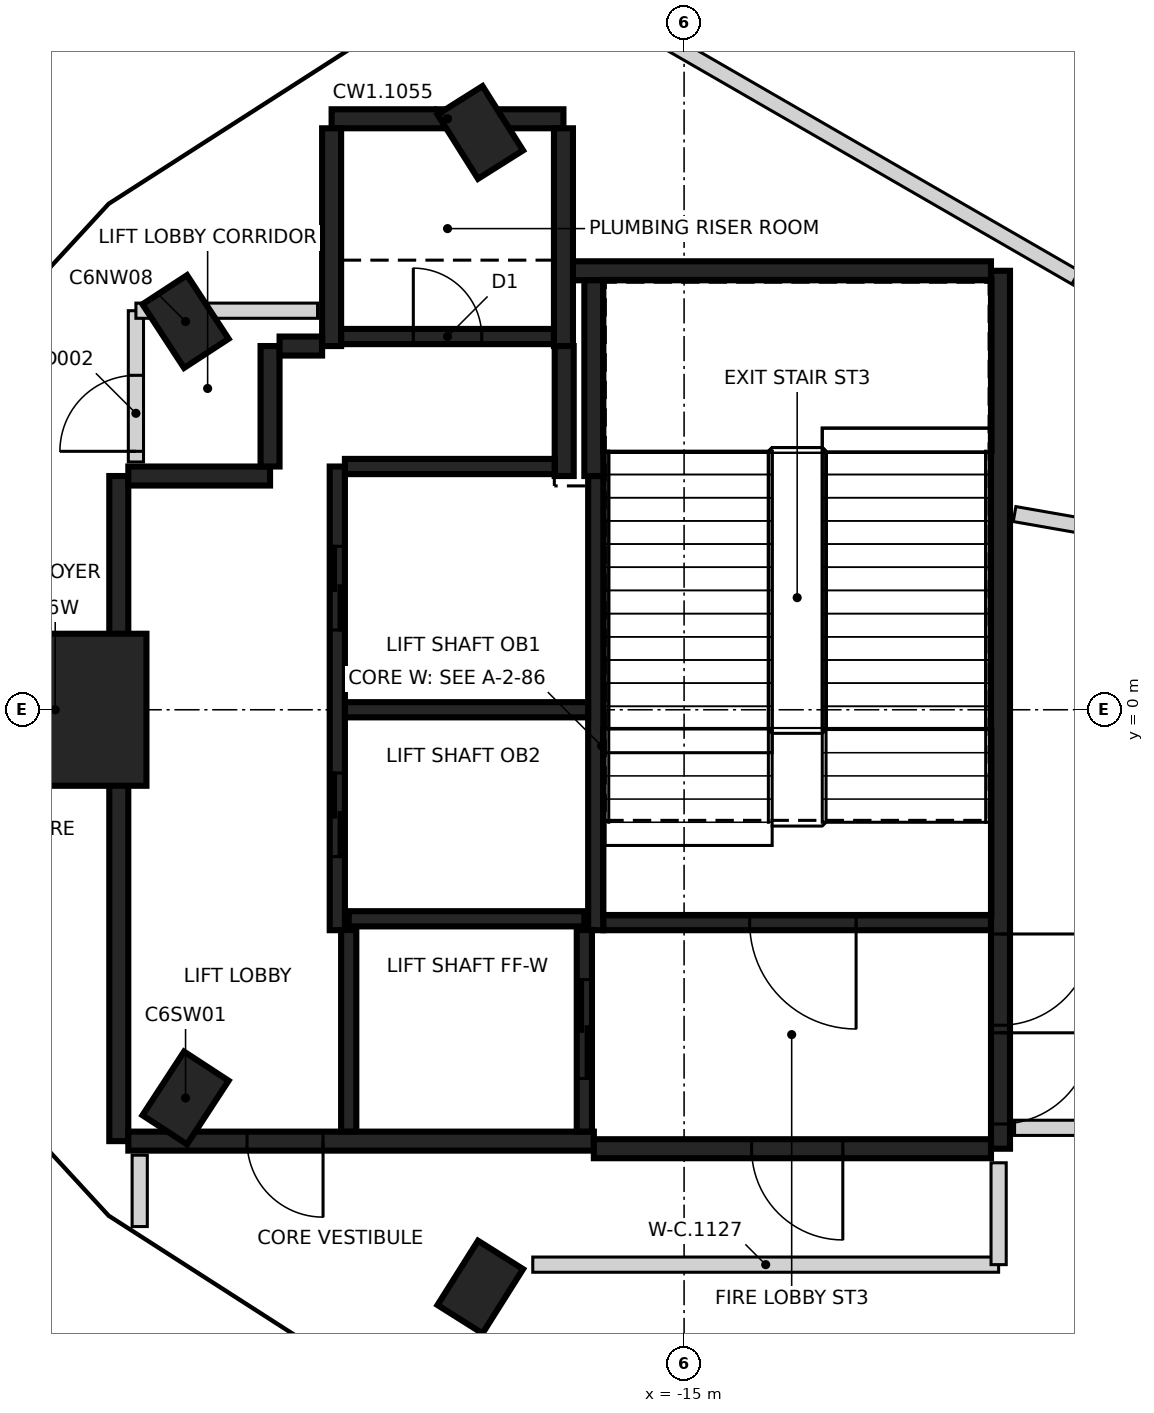
"""IFC4 building model, lengths in metres.
Left out: names, types, materials, properties, quantities, classifications, styles, units other than length and angle.
Written with IfcOpenShell. Run it as: python <this file> out.ifc"""

import sys

from ifc_helpers import new_model, si_unit, direction, frame, frame_2d, origin, origin_2d, place, context, subcontext, project, spatial, rectangle, extrude, element, fill, save


model = new_model("IFC4")
c1 = context("Model", 3, precision=1e-05, world=origin(), true_north=direction((0.0, 1.0)))
c2 = subcontext(c1, "Body", "Model", "MODEL_VIEW")
j1 = project(units=[si_unit("LENGTHUNIT", "METRE"), si_unit("PLANEANGLEUNIT", "RADIAN")], contexts=[c1])
p1 = place(None, origin())
s1 = spatial("IfcSite", under=j1, at=p1, CompositionType="ELEMENT")
p2 = place(p1, origin())
s2 = spatial("IfcBuilding", under=s1, at=p2, CompositionType="ELEMENT")
p3 = place(p2, frame((0.0, 0.0, 312.6)))
s3 = spatial("IfcBuildingStorey", under=s2, at=p3, CompositionType="ELEMENT", Elevation=312.6)
for number, where, z_axis, x_axis in (
    (1, (-17.681, 7.595, -0.35), (0.0, 0.0, 1.0), (-0.533, 0.846, 0.0)),
    (2, (-21.559, 5.107, -0.35), (0.0, 0.0, 1.0), (-0.547, 0.837, 0.0)),
    (3, (-21.559, -5.107, -0.35), (0.0, 0.0, 1.0), (0.547, 0.837, 0.0)),
    (4, (-17.681, -7.595, -0.35), (0.0, 0.0, 1.0), (0.533, 0.846, 0.0)),
):
    element("IfcColumn", number, at=place(p3, frame(where, z_axis=z_axis, x_axis=x_axis)), inside=s3, PredefinedType="COLUMN", context=c2, shape_type="SweptSolid", body=[
        extrude(rectangle(XDim=1.0, YDim=0.7, at=origin_2d()), origin(), (0.0, 0.0, 1.0), 8.1),
    ])
p4 = place(p3, frame((-23.273, 0.0, -0.35), z_axis=(0.0, 0.0, 1.0), x_axis=(1.0, 0.0, 0.0)))
e5 = element("IfcColumn", 5, at=p4, inside=s3, PredefinedType="COLUMN", context=c2, shape_type="SweptSolid", body=[
    extrude(rectangle(XDim=2.4, YDim=2.0, at=origin_2d()), origin(), (0.0, 0.0, 1.0), 8.1),
])
p5 = place(p3, frame((-10.837, 5.775, 0.0), z_axis=(0.0, 0.0, 1.0), x_axis=(0.0, -1.0, 0.0)))
e6 = element("IfcWall", 6, at=p5, inside=s3, PredefinedType="SHEAR", context=c2, shape_type="SweptSolid", body=[
    extrude(rectangle(XDim=11.55, YDim=0.25, at=frame_2d((5.775, 0.0))), origin(), (0.0, 0.0, 1.0), 7.75),
])
p6 = place(p5, frame((10.025, 0.0, 0.0)))
e7 = element("IfcOpeningElement", 7, at=p6, cuts=e6, PredefinedType="OPENING", context=c2, shape_type="SweptSolid", body=[
    extrude(rectangle(XDim=1.2, YDim=2.1, at=frame_2d((0.6, 1.05))), frame((0.0, 0.135, 0.0), z_axis=(0.0, -1.0, 0.0), x_axis=(1.0, 0.0, 0.0)), (0.0, 0.0, 1.0), 0.27),
])
p7 = place(p5, frame((8.725, 0.0, 0.0)))
e8 = element("IfcOpeningElement", 8, at=p7, cuts=e6, PredefinedType="OPENING", context=c2, shape_type="SweptSolid", body=[
    extrude(rectangle(XDim=1.2, YDim=2.1, at=frame_2d((0.6, 1.05))), frame((0.0, 0.135, 0.0), z_axis=(0.0, -1.0, 0.0), x_axis=(1.0, 0.0, 0.0)), (0.0, 0.0, 1.0), 0.27),
])
p8 = place(p3, frame((-22.437, -5.675, 0.0), z_axis=(0.0, 0.0, 1.0), x_axis=(0.0, 1.0, 0.0)))
e9 = element("IfcWall", 9, at=p8, inside=s3, PredefinedType="SHEAR", context=c2, shape_type="SweptSolid", body=[
    extrude(rectangle(XDim=8.75, YDim=0.25, at=frame_2d((4.375, 0.0))), origin(), (0.0, 0.0, 1.0), 7.75),
])
p9 = place(p3, frame((-16.187, -5.675, 0.0), z_axis=(0.0, 0.0, 1.0), x_axis=(-1.0, 0.0, 0.0)))
e10 = element("IfcWall", 10, at=p9, inside=s3, PredefinedType="SHEAR", context=c2, shape_type="SweptSolid", body=[
    extrude(rectangle(XDim=6.125, YDim=0.25, at=frame_2d((3.062, 0.0))), origin(), (0.0, 0.0, 1.0), 7.75),
])
p10 = place(p9, frame((3.563, 0.0, 0.0)))
e11 = element("IfcOpeningElement", 11, at=p10, cuts=e10, PredefinedType="OPENING", context=c2, shape_type="SweptSolid", body=[
    extrude(rectangle(XDim=1.0, YDim=2.1, at=frame_2d((0.5, 1.05))), frame((0.0, 0.135, 0.0), z_axis=(0.0, -1.0, 0.0), x_axis=(1.0, 0.0, 0.0)), (0.0, 0.0, 1.0), 0.27),
])
p11 = place(p3, frame((-10.963, -5.775, 0.0), z_axis=(0.0, 0.0, 1.0), x_axis=(-1.0, 0.0, 0.0)))
e12 = element("IfcWall", 12, at=p11, inside=s3, PredefinedType="SHEAR", context=c2, shape_type="SweptSolid", body=[
    extrude(rectangle(XDim=5.225, YDim=0.25, at=frame_2d((2.612, 0.0))), origin(), (0.0, 0.0, 1.0), 7.75),
])
p12 = place(p11, frame((1.949, 0.0, 0.0)))
e13 = element("IfcOpeningElement", 13, at=p12, cuts=e12, PredefinedType="OPENING", context=c2, shape_type="SweptSolid", body=[
    extrude(rectangle(XDim=1.2, YDim=2.1, at=frame_2d((0.6, 1.05))), frame((0.0, 0.135, 0.0), z_axis=(0.0, -1.0, 0.0), x_axis=(1.0, 0.0, 0.0)), (0.0, 0.0, 1.0), 0.27),
])
p13 = place(p3, frame((-16.472, 5.775, 0.0), z_axis=(0.0, 0.0, 1.0), x_axis=(1.0, 0.0, 0.0)))
e14 = element("IfcWall", 14, at=p13, inside=s3, PredefinedType="SHEAR", context=c2, shape_type="SweptSolid", body=[
    extrude(rectangle(XDim=5.51, YDim=0.25, at=frame_2d((2.755, 0.0))), origin(), (0.0, 0.0, 1.0), 7.75),
])
p14 = place(p3, frame((-19.637, 7.775, 0.0), z_axis=(0.0, 0.0, 1.0), x_axis=(1.0, 0.0, 0.0)))
e15 = element("IfcWall", 15, at=p14, inside=s3, PredefinedType="SHEAR", context=c2, shape_type="SweptSolid", body=[
    extrude(rectangle(XDim=3.05, YDim=0.25, at=frame_2d((1.525, 0.0))), origin(), (0.0, 0.0, 1.0), 7.75),
])
for number, where, z_axis, x_axis in (
    (16, (-16.587, 7.65, 0.0), (0.0, 0.0, 1.0), (0.0, -1.0, 0.0)),
    (17, (-19.637, 4.785, 0.0), (0.0, 0.0, 1.0), (0.0, 1.0, 0.0)),
):
    element("IfcWall", number, at=place(p3, frame(where, z_axis=z_axis, x_axis=x_axis)), inside=s3, PredefinedType="SHEAR", context=c2, shape_type="SweptSolid", body=[
        extrude(rectangle(XDim=2.865, YDim=0.25, at=frame_2d((1.432, 0.0))), origin(), (0.0, 0.0, 1.0), 7.75),
    ])
p15 = place(p3, frame((-16.187, 3.075, 0.0), z_axis=(0.0, 0.0, 1.0), x_axis=(0.0, 1.0, 0.0)))
e18 = element("IfcWall", 18, at=p15, inside=s3, PredefinedType="SHEAR", context=c2, shape_type="SweptSolid", body=[
    extrude(rectangle(XDim=2.575, YDim=0.25, at=frame_2d((1.287, 0.0))), origin(), (0.0, 0.0, 1.0), 7.75),
])
p16 = place(p3, frame((-22.312, 3.075, 0.0), z_axis=(0.0, 0.0, 1.0), x_axis=(1.0, 0.0, 0.0)))
e19 = element("IfcWall", 19, at=p16, inside=s3, PredefinedType="SHEAR", context=c2, shape_type="SweptSolid", body=[
    extrude(rectangle(XDim=1.865, YDim=0.25, at=frame_2d((0.932, 0.0))), origin(), (0.0, 0.0, 1.0), 7.75),
])
p17 = place(p3, frame((-16.577, 4.785, 0.0), z_axis=(0.0, 0.0, 1.0), x_axis=(0.0, -1.0, 0.0)))
e20 = element("IfcWall", 20, at=p17, inside=s3, PredefinedType="SHEAR", context=c2, shape_type="SweptSolid", body=[
    extrude(rectangle(XDim=1.71, YDim=0.25, at=frame_2d((0.855, 0.0))), origin(), (0.0, 0.0, 1.0), 7.75),
])
p18 = place(p3, frame((-20.447, 3.2, 0.0), z_axis=(0.0, 0.0, 1.0), x_axis=(0.0, 1.0, 0.0)))
e21 = element("IfcWall", 21, at=p18, inside=s3, PredefinedType="SHEAR", context=c2, shape_type="SweptSolid", body=[
    extrude(rectangle(XDim=1.584, YDim=0.25, at=frame_2d((0.792, 0.0))), origin(), (0.0, 0.0, 1.0), 7.75),
])
p19 = place(p3, frame((-20.322, 4.785, 0.0), z_axis=(0.0, 0.0, 1.0), x_axis=(1.0, 0.0, 0.0)))
e22 = element("IfcWall", 22, at=p19, inside=s3, PredefinedType="SHEAR", context=c2, shape_type="SweptSolid", body=[
    extrude(rectangle(XDim=0.559, YDim=0.25, at=frame_2d((0.28, 0.0))), origin(), (0.0, 0.0, 1.0), 7.75),
])
p20 = place(p3, frame((-16.162, 3.074, 0.0), z_axis=(0.0, 0.0, 1.0), x_axis=(0.0, -1.0, 0.0)))
e23 = element("IfcWall", 23, at=p20, inside=s3, PredefinedType="SHEAR", context=c2, shape_type="SweptSolid", body=[
    extrude(rectangle(XDim=5.974, YDim=0.2, at=frame_2d((2.987, 0.0))), origin(), (0.0, 0.0, 1.0), 7.75),
])
p21 = place(p3, frame((-19.562, -2.9, 0.0), z_axis=(0.0, 0.0, 1.0), x_axis=(0.0, 1.0, 0.0)))
e24 = element("IfcWall", 24, at=p21, inside=s3, PredefinedType="SHEAR", context=c2, shape_type="SweptSolid", body=[
    extrude(rectangle(XDim=6.1, YDim=0.2, at=frame_2d((3.05, 0.0))), origin(), (0.0, 0.0, 1.0), 7.75),
])
p22 = place(p21, frame((3.95, 0.0, 0.0)))
e25 = element("IfcOpeningElement", 25, at=p22, cuts=e24, PredefinedType="OPENING", context=c2, shape_type="SweptSolid", body=[
    extrude(rectangle(XDim=1.1, YDim=2.1, at=frame_2d((0.55, 1.05))), frame((0.0, 0.11, 0.0), z_axis=(0.0, -1.0, 0.0), x_axis=(1.0, 0.0, 0.0)), (0.0, 0.0, 1.0), 0.22),
])
p23 = place(p21, frame((0.968, 0.0, 0.0)))
e26 = element("IfcOpeningElement", 26, at=p23, cuts=e24, PredefinedType="OPENING", context=c2, shape_type="SweptSolid", body=[
    extrude(rectangle(XDim=1.1, YDim=2.1, at=frame_2d((0.55, 1.05))), frame((0.0, 0.11, 0.0), z_axis=(0.0, -1.0, 0.0), x_axis=(1.0, 0.0, 0.0)), (0.0, 0.0, 1.0), 0.22),
])
p24 = place(p3, frame((-10.963, -2.8, 0.0), z_axis=(0.0, 0.0, 1.0), x_axis=(-1.0, 0.0, 0.0)))
e27 = element("IfcWall", 27, at=p24, inside=s3, PredefinedType="SHEAR", context=c2, shape_type="SweptSolid", body=[
    extrude(rectangle(XDim=5.098, YDim=0.2, at=frame_2d((2.549, 0.0))), origin(), (0.0, 0.0, 1.0), 7.75),
])
p25 = place(p24, frame((1.774, 0.0, 0.0)))
e28 = element("IfcOpeningElement", 28, at=p25, cuts=e27, PredefinedType="OPENING", context=c2, shape_type="SweptSolid", body=[
    extrude(rectangle(XDim=1.4, YDim=2.1, at=frame_2d((0.7, 1.05))), frame((0.0, 0.11, 0.0), z_axis=(0.0, -1.0, 0.0), x_axis=(1.0, 0.0, 0.0)), (0.0, 0.0, 1.0), 0.22),
])
p26 = place(p3, frame((-16.263, 0.0, 0.0), z_axis=(0.0, 0.0, 1.0), x_axis=(-1.0, 0.0, 0.0)))
e29 = element("IfcWall", 29, at=p26, inside=s3, PredefinedType="SHEAR", context=c2, shape_type="SweptSolid", body=[
    extrude(rectangle(XDim=3.198, YDim=0.2, at=frame_2d((1.599, 0.0))), origin(), (0.0, 0.0, 1.0), 7.75),
])
p27 = place(p3, frame((-19.511, 4.91, 0.0), z_axis=(0.0, 0.0, 1.0), x_axis=(1.0, 0.0, 0.0)))
e30 = element("IfcWall", 30, at=p27, inside=s3, PredefinedType="SHEAR", context=c2, shape_type="SweptSolid", body=[
    extrude(rectangle(XDim=2.798, YDim=0.2, at=frame_2d((1.399, 0.0))), origin(), (0.0, 0.0, 1.0), 7.75),
])
p28 = place(p27, frame((0.949, 0.0, 0.0)))
e31 = element("IfcOpeningElement", 31, at=p28, cuts=e30, PredefinedType="OPENING", context=c2, shape_type="SweptSolid", body=[
    extrude(rectangle(XDim=0.9, YDim=2.1, at=frame_2d((0.45, 1.05))), frame((0.0, 0.11, 0.0), z_axis=(0.0, -1.0, 0.0), x_axis=(1.0, 0.0, 0.0)), (0.0, 0.0, 1.0), 0.22),
])
p29 = place(p3, frame((-19.462, 3.2, 0.0), z_axis=(0.0, 0.0, 1.0), x_axis=(1.0, 0.0, 0.0)))
e32 = element("IfcWall", 32, at=p29, inside=s3, PredefinedType="SHEAR", context=c2, shape_type="SweptSolid", body=[
    extrude(rectangle(XDim=2.759, YDim=0.2, at=frame_2d((1.379, 0.0))), origin(), (0.0, 0.0, 1.0), 7.75),
])
p30 = place(p3, frame((-19.412, -2.75, 0.0), z_axis=(0.0, 0.0, 1.0), x_axis=(1.0, 0.0, 0.0)))
e33 = element("IfcWall", 33, at=p30, inside=s3, PredefinedType="SHEAR", context=c2, shape_type="SweptSolid", body=[
    extrude(rectangle(XDim=3.1, YDim=0.2, at=frame_2d((1.55, 0.0))), origin(), (0.0, 0.0, 1.0), 7.75),
])
p31 = place(p3, frame((-16.312, -2.898, 0.0), z_axis=(0.0, 0.0, 1.0), x_axis=(0.0, -1.0, 0.0)))
e34 = element("IfcWall", 34, at=p31, inside=s3, PredefinedType="SHEAR", context=c2, shape_type="SweptSolid", body=[
    extrude(rectangle(XDim=2.651, YDim=0.2, at=frame_2d((1.325, 0.0))), origin(), (0.0, 0.0, 1.0), 7.75),
])
p32 = place(p31, frame((0.652, 0.0, 0.0)))
e35 = element("IfcOpeningElement", 35, at=p32, cuts=e34, PredefinedType="OPENING", context=c2, shape_type="SweptSolid", body=[
    extrude(rectangle(XDim=1.3, YDim=2.1, at=frame_2d((0.65, 1.05))), frame((0.0, 0.11, 0.0), z_axis=(0.0, -1.0, 0.0), x_axis=(1.0, 0.0, 0.0)), (0.0, 0.0, 1.0), 0.22),
])
p33 = place(p3, frame((-19.412, -5.549, 0.0), z_axis=(0.0, 0.0, 1.0), x_axis=(0.0, 1.0, 0.0)))
e36 = element("IfcWall", 36, at=p33, inside=s3, PredefinedType="SHEAR", context=c2, shape_type="SweptSolid", body=[
    extrude(rectangle(XDim=2.651, YDim=0.2, at=frame_2d((1.325, 0.0))), origin(), (0.0, 0.0, 1.0), 7.75),
])
p34 = place(p3, frame((-22.212, 3.26, 0.0), z_axis=(0.0, 0.0, 1.0), x_axis=(0.0, 1.0, 0.0)))
e37 = element("IfcWall", 37, at=p34, inside=s3, PredefinedType="PARTITIONING", context=c2, shape_type="SweptSolid", body=[
    extrude(rectangle(XDim=1.99, YDim=0.2, at=frame_2d((0.995, 0.0))), origin(), (0.0, 0.0, 1.0), 7.75),
])
p35 = place(p34, frame((0.14, 0.0, 0.0)))
e38 = element("IfcOpeningElement", 38, at=p35, cuts=e37, PredefinedType="OPENING", context=c2, shape_type="SweptSolid", body=[
    extrude(rectangle(XDim=1.0, YDim=2.1, at=frame_2d((0.5, 1.05))), frame((0.0, 0.11, 0.0), z_axis=(0.0, -1.0, 0.0), x_axis=(1.0, 0.0, 0.0)), (0.0, 0.0, 1.0), 0.22),
])
p36 = place(p3, frame((-22.212, 5.25, 0.0), z_axis=(0.0, 0.0, 1.0), x_axis=(1.0, 0.0, 0.0)))
e39 = element("IfcWall", 39, at=p36, inside=s3, PredefinedType="PARTITIONING", context=c2, shape_type="SweptSolid", body=[
    extrude(rectangle(XDim=2.39, YDim=0.2, at=frame_2d((1.195, 0.0))), origin(), (0.0, 0.0, 1.0), 7.75),
])
p37 = place(p3, frame((-22.162, -6.799, 0.0), z_axis=(0.0, 0.0, 1.0), x_axis=(0.0, 1.0, 0.0)))
e40 = element("IfcWall", 40, at=p37, inside=s3, PredefinedType="PARTITIONING", context=c2, shape_type="SweptSolid", body=[
    extrude(rectangle(XDim=0.939, YDim=0.2, at=frame_2d((0.469, 0.0))), origin(), (0.0, 0.0, 1.0), 7.75),
])
p38 = place(p3, frame((-16.991, -7.3, 0.0), z_axis=(0.0, 0.0, 1.0), x_axis=(1.0, 0.0, 0.0)))
e41 = element("IfcWall", 41, at=p38, inside=s3, PredefinedType="PARTITIONING", context=c2, shape_type="SweptSolid", body=[
    extrude(rectangle(XDim=6.129, YDim=0.2, at=frame_2d((3.064, 0.0))), origin(), (0.0, 0.0, 1.0), 7.75),
])
p39 = place(p3, frame((-10.862, -7.3, 0.0), z_axis=(0.0, 0.0, 1.0), x_axis=(0.0, 1.0, 0.0)))
e42 = element("IfcWall", 42, at=p39, inside=s3, PredefinedType="PARTITIONING", context=c2, shape_type="SweptSolid", body=[
    extrude(rectangle(XDim=1.34, YDim=0.2, at=frame_2d((0.67, 0.0))), origin(), (0.0, 0.0, 1.0), 7.75),
])
p40 = place(p3, frame((-26.168, 0.0, 0.0), z_axis=(0.0, 0.0, 1.0), x_axis=(1.0, 0.0, 0.0)))
e43 = element("IfcWall", 43, at=p40, inside=s3, PredefinedType="PARTITIONING", context=c2, shape_type="SweptSolid", body=[
    extrude(rectangle(XDim=3.546, YDim=0.2, at=frame_2d((1.773, 0.0))), origin(), (0.0, 0.0, 1.0), 7.75),
])
p41 = place(p40, frame((0.298, 0.0, 0.0)))
e44 = element("IfcOpeningElement", 44, at=p41, cuts=e43, PredefinedType="OPENING", context=c2, shape_type="SweptSolid", body=[
    extrude(rectangle(XDim=0.9, YDim=2.1, at=frame_2d((0.45, 1.05))), frame((0.0, 0.11, 0.0), z_axis=(0.0, -1.0, 0.0), x_axis=(1.0, 0.0, 0.0)), (0.0, 0.0, 1.0), 0.22),
])
p42 = place(p3, frame((-17.312, 9.995, 0.0), z_axis=(0.0, 0.0, 1.0), x_axis=(0.866015691277, -0.500016822178, 0.0)))
e45 = element("IfcWall", 45, at=p42, inside=s3, PredefinedType="PARTITIONING", context=c2, shape_type="SweptSolid", body=[
    extrude(rectangle(XDim=16.488, YDim=0.2, at=frame_2d((8.244, 0.0))), origin(), (0.0, 0.0, 1.0), 7.75),
])
p43 = place(p42, frame((8.617, 0.0, 0.0)))
e46 = element("IfcOpeningElement", 46, at=p43, cuts=e45, PredefinedType="OPENING", context=c2, shape_type="SweptSolid", body=[
    extrude(rectangle(XDim=1.0, YDim=2.1, at=frame_2d((0.5, 1.05))), frame((0.0, 0.11, 0.0), z_axis=(0.0, -1.0, 0.0), x_axis=(1.0, 0.0, 0.0)), (0.0, 0.0, 1.0), 0.22),
])
p44 = place(p3, frame((-10.968, -13.846, 0.0), z_axis=(0.0, 0.0, 1.0), x_axis=(0.620920629301, 0.783873441385, 0.0)))
e47 = element("IfcWall", 47, at=p44, inside=s3, PredefinedType="PARTITIONING", context=c2, shape_type="SweptSolid", body=[
    extrude(rectangle(XDim=12.724, YDim=0.2, at=frame_2d((6.362, 0.0))), origin(), (0.0, 0.0, 1.0), 7.75),
])
p45 = place(p3, frame((-10.652, -5.5, 0.0), z_axis=(0.0, 0.0, 1.0), x_axis=(1.0, 0.0, 0.0)))
e48 = element("IfcWall", 48, at=p45, inside=s3, PredefinedType="PARTITIONING", context=c2, shape_type="SweptSolid", body=[
    extrude(rectangle(XDim=1.989, YDim=0.2, at=frame_2d((0.995, 0.0))), origin(), (0.0, 0.0, 1.0), 7.75),
])
p46 = place(p3, frame((-10.652, 2.575, 0.0), z_axis=(0.0, 0.0, 1.0), x_axis=(0.985029357115, -0.172386674722, 0.0)))
e49 = element("IfcWall", 49, at=p46, inside=s3, PredefinedType="PARTITIONING", context=c2, shape_type="SweptSolid", body=[
    extrude(rectangle(XDim=7.469, YDim=0.2, at=frame_2d((3.735, 0.0))), origin(), (0.0, 0.0, 1.0), 7.75),
])
p47 = place(p46, frame((2.507, 0.0, 0.0)))
e50 = element("IfcOpeningElement", 50, at=p47, cuts=e49, PredefinedType="OPENING", context=c2, shape_type="SweptSolid", body=[
    extrude(rectangle(XDim=2.4, YDim=2.1, at=frame_2d((1.2, 1.05))), frame((0.0, 0.11, 0.0), z_axis=(0.0, -1.0, 0.0), x_axis=(1.0, 0.0, 0.0)), (0.0, 0.0, 1.0), 0.22),
])
p48 = place(p32, origin())
e51 = element("IfcDoor", 51, at=p48, inside=s3, OperationType="SLIDING_TO_RIGHT", PredefinedType="DOOR", context=c2, shape_type="SweptSolid", body=[
    extrude(rectangle(XDim=1.3, YDim=2.1, at=frame_2d((0.65, 1.05))), frame((0.0, 0.025, 0.0), z_axis=(0.0, -1.0, 0.0), x_axis=(1.0, 0.0, 0.0)), (0.0, 0.0, 1.0), 0.05),
])
fill(e35, e51)
p49 = place(p22, origin())
e52 = element("IfcDoor", 52, at=p49, inside=s3, OperationType="DOUBLE_DOOR_SLIDING", PredefinedType="DOOR", context=c2, shape_type="SweptSolid", body=[
    extrude(rectangle(XDim=1.1, YDim=2.1, at=frame_2d((0.55, 1.05))), frame((0.0, 0.025, 0.0), z_axis=(0.0, -1.0, 0.0), x_axis=(1.0, 0.0, 0.0)), (0.0, 0.0, 1.0), 0.05),
])
fill(e25, e52)
p50 = place(p23, origin())
e53 = element("IfcDoor", 53, at=p50, inside=s3, OperationType="DOUBLE_DOOR_SLIDING", PredefinedType="DOOR", context=c2, shape_type="SweptSolid", body=[
    extrude(rectangle(XDim=1.1, YDim=2.1, at=frame_2d((0.55, 1.05))), frame((0.0, 0.025, 0.0), z_axis=(0.0, -1.0, 0.0), x_axis=(1.0, 0.0, 0.0)), (0.0, 0.0, 1.0), 0.05),
])
fill(e26, e53)
p51 = place(p10, origin())
e54 = element("IfcDoor", 54, at=p51, inside=s3, OperationType="SINGLE_SWING_LEFT", PredefinedType="DOOR", context=c2, shape_type="SweptSolid", body=[
    extrude(rectangle(XDim=1.0, YDim=2.1, at=frame_2d((0.5, 1.05))), frame((0.0, 0.025, 0.0), z_axis=(0.0, -1.0, 0.0), x_axis=(1.0, 0.0, 0.0)), (0.0, 0.0, 1.0), 0.05),
])
fill(e11, e54)
p52 = place(p6, origin())
e55 = element("IfcDoor", 55, at=p52, inside=s3, OperationType="SINGLE_SWING_LEFT", PredefinedType="DOOR", context=c2, shape_type="SweptSolid", body=[
    extrude(rectangle(XDim=1.2, YDim=2.1, at=frame_2d((0.6, 1.05))), frame((0.0, 0.025, 0.0), z_axis=(0.0, -1.0, 0.0), x_axis=(1.0, 0.0, 0.0)), (0.0, 0.0, 1.0), 0.05),
])
fill(e7, e55)
p53 = place(p7, origin())
e56 = element("IfcDoor", 56, at=p53, inside=s3, OperationType="SINGLE_SWING_RIGHT", PredefinedType="DOOR", context=c2, shape_type="SweptSolid", body=[
    extrude(rectangle(XDim=1.2, YDim=2.1, at=frame_2d((0.6, 1.05))), frame((0.0, 0.025, 0.0), z_axis=(0.0, -1.0, 0.0), x_axis=(1.0, 0.0, 0.0)), (0.0, 0.0, 1.0), 0.05),
])
fill(e8, e56)
p54 = place(p12, origin())
e57 = element("IfcDoor", 57, at=p54, inside=s3, OperationType="SINGLE_SWING_LEFT", PredefinedType="DOOR", context=c2, shape_type="SweptSolid", body=[
    extrude(rectangle(XDim=1.2, YDim=2.1, at=frame_2d((0.6, 1.05))), frame((0.0, 0.025, 0.0), z_axis=(0.0, -1.0, 0.0), x_axis=(1.0, 0.0, 0.0)), (0.0, 0.0, 1.0), 0.05),
])
fill(e13, e57)
p55 = place(p25, origin())
e58 = element("IfcDoor", 58, at=p55, inside=s3, OperationType="SINGLE_SWING_LEFT", PredefinedType="DOOR", context=c2, shape_type="SweptSolid", body=[
    extrude(rectangle(XDim=1.4, YDim=2.1, at=frame_2d((0.7, 1.05))), frame((0.0, 0.025, 0.0), z_axis=(0.0, -1.0, 0.0), x_axis=(1.0, 0.0, 0.0)), (0.0, 0.0, 1.0), 0.05),
])
fill(e28, e58)
p56 = place(p28, origin())
e59 = element("IfcDoor", 59, at=p56, inside=s3, OperationType="SINGLE_SWING_RIGHT", PredefinedType="DOOR", context=c2, shape_type="SweptSolid", body=[
    extrude(rectangle(XDim=0.9, YDim=2.1, at=frame_2d((0.45, 1.05))), frame((0.0, 0.025, 0.0), z_axis=(0.0, -1.0, 0.0), x_axis=(1.0, 0.0, 0.0)), (0.0, 0.0, 1.0), 0.05),
])
fill(e31, e59)
p57 = place(p35, frame((1.0, 0.0, 0.0), z_axis=(0.0, 0.0, 1.0), x_axis=(-1.0, 0.0, 0.0)))
e60 = element("IfcDoor", 60, at=p57, inside=s3, OperationType="SINGLE_SWING_LEFT", PredefinedType="DOOR", context=c2, shape_type="SweptSolid", body=[
    extrude(rectangle(XDim=1.0, YDim=2.1, at=frame_2d((0.5, 1.05))), frame((0.0, 0.025, 0.0), z_axis=(0.0, -1.0, 0.0), x_axis=(1.0, 0.0, 0.0)), (0.0, 0.0, 1.0), 0.05),
])
fill(e38, e60)
save(model, sys.argv[1])
